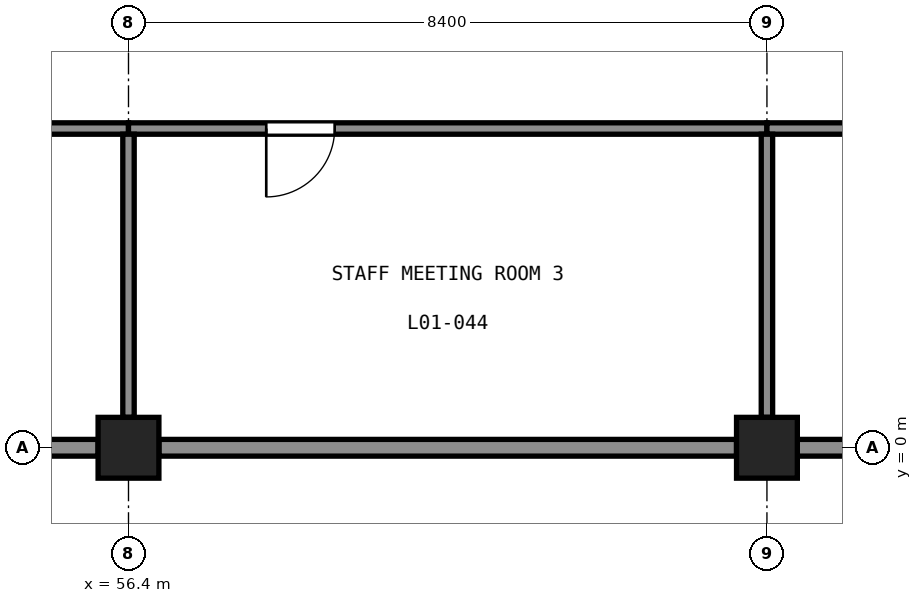
"""IFC4 building model, lengths in metres.
Left out: names, types, materials, properties, quantities, classifications, styles, units other than length and angle.
Written with IfcOpenShell. Run it as: python <this file> out.ifc"""

import sys

from ifc_helpers import new_model, si_unit, direction, frame, frame_2d, origin, origin_2d, place, context, subcontext, project, spatial, rectangle, extrude, element, fill, save


model = new_model("IFC4")
c1 = context("Model", 3, precision=1e-05, world=origin(), true_north=direction((0.0, 1.0)))
c2 = subcontext(c1, "Body", "Model", "MODEL_VIEW")
j1 = project(units=[si_unit("LENGTHUNIT", "METRE"), si_unit("PLANEANGLEUNIT", "RADIAN")], contexts=[c1])
p1 = place(None, origin())
s1 = spatial("IfcSite", under=j1, at=p1, CompositionType="ELEMENT")
p2 = place(p1, origin())
s2 = spatial("IfcBuilding", under=s1, at=p2, CompositionType="ELEMENT")
p3 = place(p2, frame((0.0, 0.0, 5.5)))
s3 = spatial("IfcBuildingStorey", under=s2, at=p3, CompositionType="ELEMENT", Elevation=5.5)
for number, where, z_axis, x_axis in (
    (1, (56.4, 0.0, 0.0), (0.0, 0.0, 1.0), (1.0, 0.0, 0.0)),
    (2, (64.8, 0.0, 0.0), (0.0, 0.0, 1.0), (1.0, 0.0, 0.0)),
):
    element("IfcColumn", number, at=place(p3, frame(where, z_axis=z_axis, x_axis=x_axis)), inside=s3, PredefinedType="COLUMN", context=c2, shape_type="SweptSolid", body=[
        extrude(rectangle(XDim=0.8, YDim=0.8, at=origin_2d()), origin(), (0.0, 0.0, 1.0), 5.0),
    ])
p4 = place(p3, frame((48.4, 0.0, 0.0), z_axis=(0.0, 0.0, 1.0), x_axis=(1.0, 0.0, 0.0)))
e3 = element("IfcWall", 3, at=p4, inside=s3, PredefinedType="SOLIDWALL", context=c2, shape_type="SweptSolid", body=[
    extrude(rectangle(XDim=7.6, YDim=0.22, at=frame_2d((3.8, 0.0))), origin(), (0.0, 0.0, 1.0), 3.94),
])
p5 = place(p3, frame((56.8, 0.0, 0.0), z_axis=(0.0, 0.0, 1.0), x_axis=(1.0, 0.0, 0.0)))
e4 = element("IfcWall", 4, at=p5, inside=s3, PredefinedType="SOLIDWALL", context=c2, shape_type="SweptSolid", body=[
    extrude(rectangle(XDim=7.6, YDim=0.22, at=frame_2d((3.8, 0.0))), origin(), (0.0, 0.0, 1.0), 3.94),
])
p6 = place(p3, frame((65.2, 0.0, 0.0), z_axis=(0.0, 0.0, 1.0), x_axis=(1.0, 0.0, 0.0)))
e5 = element("IfcWall", 5, at=p6, inside=s3, PredefinedType="SOLIDWALL", context=c2, shape_type="SweptSolid", body=[
    extrude(rectangle(XDim=7.6, YDim=0.22, at=frame_2d((3.8, 0.0))), origin(), (0.0, 0.0, 1.0), 3.94),
])
p7 = place(p3, frame((48.0, 4.2, 0.0), z_axis=(0.0, 0.0, 1.0), x_axis=(1.0, 0.0, 0.0)))
e6 = element("IfcWall", 6, at=p7, inside=s3, PredefinedType="PARTITIONING", context=c2, shape_type="SweptSolid", body=[
    extrude(rectangle(XDim=8.4, YDim=0.15, at=frame_2d((4.2, 0.0))), origin(), (0.0, 0.0, 1.0), 3.9),
])
p8 = place(p3, frame((56.4, 4.2, 0.0), z_axis=(0.0, 0.0, 1.0), x_axis=(1.0, 0.0, 0.0)))
e7 = element("IfcWall", 7, at=p8, inside=s3, PredefinedType="PARTITIONING", context=c2, shape_type="SweptSolid", body=[
    extrude(rectangle(XDim=8.4, YDim=0.15, at=frame_2d((4.2, 0.0))), origin(), (0.0, 0.0, 1.0), 3.9),
])
p9 = place(p8, frame((1.812, 0.0, 0.0)))
e8 = element("IfcOpeningElement", 8, at=p9, cuts=e7, PredefinedType="OPENING", context=c2, shape_type="SweptSolid", body=[
    extrude(rectangle(XDim=0.9, YDim=2.1, at=frame_2d((0.45, 1.05))), frame((0.0, 0.085, 0.0), z_axis=(0.0, -1.0, 0.0), x_axis=(1.0, 0.0, 0.0)), (0.0, 0.0, 1.0), 0.17),
])
p10 = place(p3, frame((64.8, 4.2, 0.0), z_axis=(0.0, 0.0, 1.0), x_axis=(1.0, 0.0, 0.0)))
e9 = element("IfcWall", 9, at=p10, inside=s3, PredefinedType="PARTITIONING", context=c2, shape_type="SweptSolid", body=[
    extrude(rectangle(XDim=8.4, YDim=0.15, at=frame_2d((4.2, 0.0))), origin(), (0.0, 0.0, 1.0), 3.9),
])
p11 = place(p10, frame((1.65, 0.0, 0.0)))
e10 = element("IfcOpeningElement", 10, at=p11, cuts=e9, PredefinedType="OPENING", context=c2, shape_type="SweptSolid", body=[
    extrude(rectangle(XDim=0.9, YDim=2.1, at=frame_2d((0.45, 1.05))), frame((0.0, 0.085, 0.0), z_axis=(0.0, -1.0, 0.0), x_axis=(1.0, 0.0, 0.0)), (0.0, 0.0, 1.0), 0.17),
])
p12 = place(p10, frame((5.85, 0.0, 0.0)))
e11 = element("IfcOpeningElement", 11, at=p12, cuts=e9, PredefinedType="OPENING", context=c2, shape_type="SweptSolid", body=[
    extrude(rectangle(XDim=0.9, YDim=2.1, at=frame_2d((0.45, 1.05))), frame((0.0, 0.085, 0.0), z_axis=(0.0, -1.0, 0.0), x_axis=(1.0, 0.0, 0.0)), (0.0, 0.0, 1.0), 0.17),
])
for number, where, z_axis, x_axis in (
    (12, (56.4, 0.4, 0.0), (0.0, 0.0, 1.0), (0.0, 1.0, 0.0)),
    (13, (64.8, 0.4, 0.0), (0.0, 0.0, 1.0), (0.0, 1.0, 0.0)),
):
    element("IfcWall", number, at=place(p3, frame(where, z_axis=z_axis, x_axis=x_axis)), inside=s3, PredefinedType="PARTITIONING", context=c2, shape_type="SweptSolid", body=[
        extrude(rectangle(XDim=3.725, YDim=0.15, at=frame_2d((1.863, 0.0))), origin(), (0.0, 0.0, 1.0), 3.9),
    ])
p13 = place(p9, origin())
e14 = element("IfcDoor", 14, at=p13, inside=s3, OperationType="SINGLE_SWING_LEFT", PredefinedType="DOOR", context=c2, shape_type="SweptSolid", body=[
    extrude(rectangle(XDim=0.9, YDim=2.1, at=frame_2d((0.45, 1.05))), frame((0.0, 0.025, 0.0), z_axis=(0.0, -1.0, 0.0), x_axis=(1.0, 0.0, 0.0)), (0.0, 0.0, 1.0), 0.05),
])
fill(e8, e14)
save(model, sys.argv[1])
